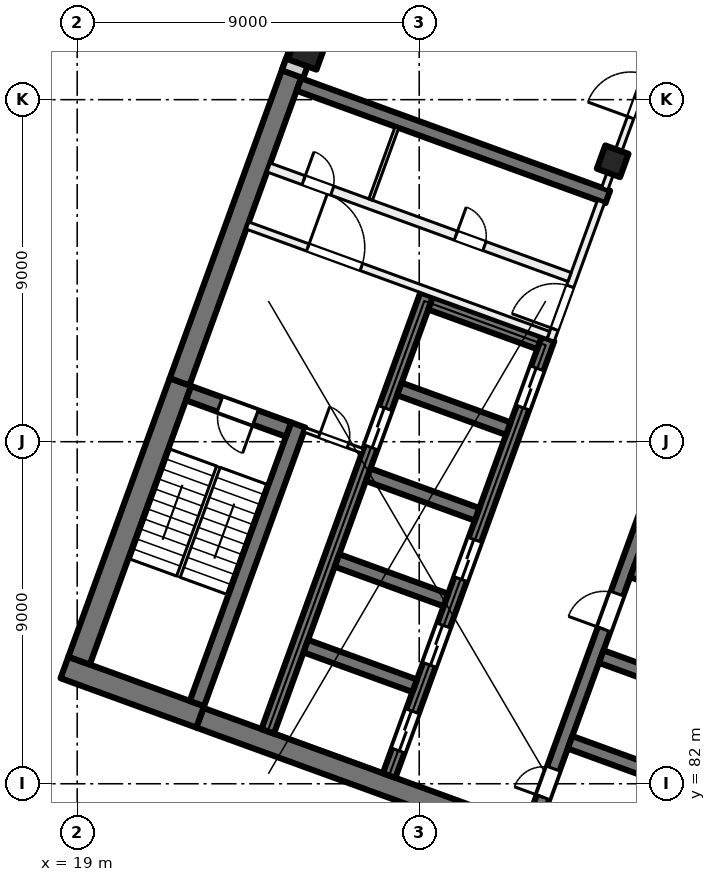
"""IFC4 building model, lengths in metres.
Left out: names, types, materials, properties, quantities, classifications, styles, units other than length and angle.
Written with IfcOpenShell. Run it as: python <this file> out.ifc"""

import sys

from ifc_helpers import new_model, si_unit, direction, frame, frame_2d, origin, origin_2d, place, context, subcontext, project, spatial, rectangle, extrude, element, fill, save


model = new_model("IFC4")
c1 = context("Model", 3, precision=1e-05, world=origin(), true_north=direction((0.0, 1.0)))
c2 = subcontext(c1, "Body", "Model", "MODEL_VIEW")
j1 = project(units=[si_unit("LENGTHUNIT", "METRE"), si_unit("PLANEANGLEUNIT", "RADIAN")], contexts=[c1])
p1 = place(None, origin())
s1 = spatial("IfcSite", under=j1, at=p1, CompositionType="ELEMENT")
p2 = place(p1, origin())
s2 = spatial("IfcBuilding", under=s1, at=p2, CompositionType="ELEMENT")
p3 = place(p2, frame((0.0, 0.0, 174.5)))
s3 = spatial("IfcBuildingStorey", under=s2, at=p3, CompositionType="ELEMENT", Elevation=174.5)
p4 = place(p3, frame((33.091, 98.379, 0.0), z_axis=(0.0, 0.0, 1.0), x_axis=(-0.342020143326, -0.939692620786, 0.0)))
e1 = element("IfcColumn", 1, at=p4, inside=s3, PredefinedType="COLUMN", context=c2, shape_type="SweptSolid", body=[
    extrude(rectangle(XDim=0.65, YDim=0.65, at=origin_2d()), origin(), (0.0, 0.0, 1.0), 4.0),
])
p5 = place(p3, frame((25.056, 101.303, 0.0), z_axis=(0.0, 0.0, 1.0), x_axis=(-0.342020143326, -0.939692620786, 0.0)))
e2 = element("IfcColumn", 2, at=p5, inside=s3, PredefinedType="COLUMN", context=c2, shape_type="SweptSolid", body=[
    extrude(rectangle(XDim=0.8, YDim=0.8, at=origin_2d()), origin(), (0.0, 0.0, 1.0), 4.0),
])
p6 = place(p3, frame((35.759, 78.811, 0.0), z_axis=(0.0, 0.0, 1.0), x_axis=(-0.939692894512, 0.342019391267, 0.0)))
e3 = element("IfcWall", 3, at=p6, inside=s3, PredefinedType="SHEAR", context=c2, shape_type="SweptSolid", body=[
    extrude(rectangle(XDim=14.4, YDim=0.55, at=frame_2d((7.2, 0.0))), origin(), (0.0, 0.0, 1.0), 4.0),
])
p7 = place(p3, frame((22.236, 83.76, 0.0), z_axis=(0.0, 0.0, 1.0), x_axis=(-0.939680822529, 0.342052557032, 0.0)))
e4 = element("IfcWall", 4, at=p7, inside=s3, PredefinedType="SHEAR", context=c2, shape_type="SweptSolid", body=[
    extrude(rectangle(XDim=3.8, YDim=0.6, at=frame_2d((1.9, 0.0))), origin(), (0.0, 0.0, 1.0), 4.0),
])
p8 = place(p3, frame((19.05, 85.239, 0.0), z_axis=(0.0, 0.0, 1.0), x_axis=(0.342016982193, 0.939693771338, 0.0)))
e5 = element("IfcWall", 5, at=p8, inside=s3, PredefinedType="SHEAR", context=c2, shape_type="SweptSolid", body=[
    extrude(rectangle(XDim=7.8, YDim=0.6, at=frame_2d((3.9, 0.0))), origin(), (0.0, 0.0, 1.0), 4.0),
])
p9 = place(p3, frame((21.694, 92.577, 0.0), z_axis=(0.0, 0.0, 1.0), x_axis=(0.342010253184, 0.939696220444, 0.0)))
e6 = element("IfcWall", 6, at=p9, inside=s3, PredefinedType="SHEAR", context=c2, shape_type="SweptSolid", body=[
    extrude(rectangle(XDim=8.95, YDim=0.55, at=frame_2d((4.475, 0.0))), origin(), (0.0, 0.0, 1.0), 4.0),
])
p10 = place(p3, frame((22.15, 84.11, 0.0), z_axis=(0.0, 0.0, 1.0), x_axis=(0.342016982193, 0.939693771338, 0.0)))
e7 = element("IfcWall", 7, at=p10, inside=s3, PredefinedType="SHEAR", context=c2, shape_type="SweptSolid", body=[
    extrude(rectangle(XDim=7.8, YDim=0.4, at=frame_2d((3.9, 0.0))), origin(), (0.0, 0.0, 1.0), 4.0),
])
p11 = place(p3, frame((24.562, 91.32, 0.0), z_axis=(0.0, 0.0, 1.0), x_axis=(-0.939717030584, 0.341953070509, 0.0)))
e8 = element("IfcWall", 8, at=p11, inside=s3, PredefinedType="SHEAR", context=c2, shape_type="SweptSolid", body=[
    extrude(rectangle(XDim=2.8, YDim=0.4, at=frame_2d((1.4, 0.0))), origin(), (0.0, 0.0, 1.0), 4.0),
])
p12 = place(p11, frame((0.925, 0.0, 0.0)))
e9 = element("IfcOpeningElement", 9, at=p12, cuts=e8, PredefinedType="OPENING", context=c2, shape_type="SweptSolid", body=[
    extrude(rectangle(XDim=1.0, YDim=2.1, at=frame_2d((0.5, 1.05))), frame((0.0, 0.21, 0.0), z_axis=(0.0, -1.0, 0.0), x_axis=(1.0, 0.0, 0.0)), (0.0, 0.0, 1.0), 0.42),
])
p13 = place(p3, frame((30.967, 80.848, 0.0), z_axis=(0.0, 0.0, 1.0), x_axis=(0.34201563943, 0.939694260058, 0.0)))
e10 = element("IfcWall", 10, at=p13, inside=s3, PredefinedType="SHEAR", context=c2, shape_type="SweptSolid", body=[
    extrude(rectangle(XDim=12.225, YDim=0.35, at=frame_2d((6.113, 0.0))), origin(), (0.0, 0.0, 1.0), 4.0),
])
p14 = place(p13, frame((0.85, 0.0, 0.0)))
e11 = element("IfcOpeningElement", 11, at=p14, cuts=e10, PredefinedType="OPENING", context=c2, shape_type="SweptSolid", body=[
    extrude(rectangle(XDim=0.8, YDim=2.1, at=frame_2d((0.4, 1.05))), frame((0.0, 0.185, 0.0), z_axis=(0.0, -1.0, 0.0), x_axis=(1.0, 0.0, 0.0)), (0.0, 0.0, 1.0), 0.37),
])
p15 = place(p13, frame((5.55, 0.0, 0.0)))
e12 = element("IfcOpeningElement", 12, at=p15, cuts=e10, PredefinedType="OPENING", context=c2, shape_type="SweptSolid", body=[
    extrude(rectangle(XDim=1.0, YDim=2.1, at=frame_2d((0.5, 1.05))), frame((0.0, 0.185, 0.0), z_axis=(0.0, -1.0, 0.0), x_axis=(1.0, 0.0, 0.0)), (0.0, 0.0, 1.0), 0.37),
])
p16 = place(p3, frame((34.835, 82.047, 0.0), z_axis=(0.0, 0.0, 1.0), x_axis=(-0.939683528043, 0.3420451244, 0.0)))
e13 = element("IfcWall", 13, at=p16, inside=s3, PredefinedType="SHEAR", context=c2, shape_type="SweptSolid", body=[
    extrude(rectangle(XDim=3.05, YDim=0.35, at=frame_2d((1.525, 0.0))), origin(), (0.0, 0.0, 1.0), 4.0),
])
p17 = place(p3, frame((35.656, 84.303, 0.0), z_axis=(0.0, 0.0, 1.0), x_axis=(-0.939709254651, 0.341974438698, 0.0)))
e14 = element("IfcWall", 14, at=p17, inside=s3, PredefinedType="SHEAR", context=c2, shape_type="SweptSolid", body=[
    extrude(rectangle(XDim=3.05, YDim=0.35, at=frame_2d((1.525, 0.0))), origin(), (0.0, 0.0, 1.0), 4.0),
])
p18 = place(p3, frame((36.477, 86.558, 0.0), z_axis=(0.0, 0.0, 1.0), x_axis=(-0.939683528043, 0.3420451244, 0.0)))
e15 = element("IfcWall", 15, at=p18, inside=s3, PredefinedType="SHEAR", context=c2, shape_type="SweptSolid", body=[
    extrude(rectangle(XDim=3.05, YDim=0.35, at=frame_2d((1.525, 0.0))), origin(), (0.0, 0.0, 1.0), 4.0),
])
p19 = place(p3, frame((27.208, 82.216, 0.0), z_axis=(0.0, 0.0, 1.0), x_axis=(0.34201563943, 0.939694260058, 0.0)))
e16 = element("IfcWall", 16, at=p19, inside=s3, PredefinedType="SHEAR", context=c2, shape_type="SweptSolid", body=[
    extrude(rectangle(XDim=12.225, YDim=0.35, at=frame_2d((6.113, 0.0))), origin(), (0.0, 0.0, 1.0), 4.0),
])
p20 = place(p19, frame((0.7, 0.0, 0.0)))
e17 = element("IfcOpeningElement", 17, at=p20, cuts=e16, PredefinedType="OPENING", context=c2, shape_type="SweptSolid", body=[
    extrude(rectangle(XDim=1.1, YDim=2.1, at=frame_2d((0.55, 1.05))), frame((0.0, 0.185, 0.0), z_axis=(0.0, -1.0, 0.0), x_axis=(1.0, 0.0, 0.0)), (0.0, 0.0, 1.0), 0.37),
])
p21 = place(p19, frame((3.1, 0.0, 0.0)))
e18 = element("IfcOpeningElement", 18, at=p21, cuts=e16, PredefinedType="OPENING", context=c2, shape_type="SweptSolid", body=[
    extrude(rectangle(XDim=1.1, YDim=2.1, at=frame_2d((0.55, 1.05))), frame((0.0, 0.185, 0.0), z_axis=(0.0, -1.0, 0.0), x_axis=(1.0, 0.0, 0.0)), (0.0, 0.0, 1.0), 0.37),
])
p22 = place(p19, frame((5.5, 0.0, 0.0)))
e19 = element("IfcOpeningElement", 19, at=p22, cuts=e16, PredefinedType="OPENING", context=c2, shape_type="SweptSolid", body=[
    extrude(rectangle(XDim=1.1, YDim=2.1, at=frame_2d((0.55, 1.05))), frame((0.0, 0.185, 0.0), z_axis=(0.0, -1.0, 0.0), x_axis=(1.0, 0.0, 0.0)), (0.0, 0.0, 1.0), 0.37),
])
p23 = place(p19, frame((10.3, 0.0, 0.0)))
e20 = element("IfcOpeningElement", 20, at=p23, cuts=e16, PredefinedType="OPENING", context=c2, shape_type="SweptSolid", body=[
    extrude(rectangle(XDim=1.1, YDim=2.1, at=frame_2d((0.55, 1.05))), frame((0.0, 0.185, 0.0), z_axis=(0.0, -1.0, 0.0), x_axis=(1.0, 0.0, 0.0)), (0.0, 0.0, 1.0), 0.37),
])
p24 = place(p3, frame((24.013, 83.379, 0.0), z_axis=(0.0, 0.0, 1.0), x_axis=(0.34201563943, 0.939694260058, 0.0)))
e21 = element("IfcWall", 21, at=p24, inside=s3, PredefinedType="SHEAR", context=c2, shape_type="SweptSolid", body=[
    extrude(rectangle(XDim=12.225, YDim=0.35, at=frame_2d((6.113, 0.0))), origin(), (0.0, 0.0, 1.0), 4.0),
])
p25 = place(p24, frame((7.95, 0.0, 0.0)))
e22 = element("IfcOpeningElement", 22, at=p25, cuts=e21, PredefinedType="OPENING", context=c2, shape_type="SweptSolid", body=[
    extrude(rectangle(XDim=1.1, YDim=2.1, at=frame_2d((0.55, 1.05))), frame((0.0, 0.185, 0.0), z_axis=(0.0, -1.0, 0.0), x_axis=(1.0, 0.0, 0.0)), (0.0, 0.0, 1.0), 0.37),
])
for number, where, z_axis, x_axis in (
    (23, (27.881, 84.578, 0.0), (0.0, 0.0, 1.0), (-0.94, 0.342, 0.0)),
    (24, (28.702, 86.833, 0.0), (0.0, 0.0, 1.0), (-0.94, 0.342, 0.0)),
    (25, (29.523, 89.089, 0.0), (0.0, 0.0, 1.0), (-0.94, 0.342, 0.0)),
):
    element("IfcWall", number, at=place(p3, frame(where, z_axis=z_axis, x_axis=x_axis)), inside=s3, PredefinedType="SHEAR", context=c2, shape_type="SweptSolid", body=[
        extrude(rectangle(XDim=3.05, YDim=0.35, at=frame_2d((1.525, 0.0))), origin(), (0.0, 0.0, 1.0), 4.0),
    ])
p26 = place(p3, frame((30.344, 91.344, 0.0), z_axis=(0.0, 0.0, 1.0), x_axis=(-0.939709254651, 0.341974438698, 0.0)))
e26 = element("IfcWall", 26, at=p26, inside=s3, PredefinedType="SHEAR", context=c2, shape_type="SweptSolid", body=[
    extrude(rectangle(XDim=3.05, YDim=0.35, at=frame_2d((1.525, 0.0))), origin(), (0.0, 0.0, 1.0), 4.0),
])
p27 = place(p3, frame((31.165, 93.599, 0.0), z_axis=(0.0, 0.0, 1.0), x_axis=(-0.939683528043, 0.3420451244, 0.0)))
e27 = element("IfcWall", 27, at=p27, inside=s3, PredefinedType="SHEAR", context=c2, shape_type="SweptSolid", body=[
    extrude(rectangle(XDim=3.05, YDim=0.35, at=frame_2d((1.525, 0.0))), origin(), (0.0, 0.0, 1.0), 4.0),
])
p28 = place(p3, frame((32.962, 97.441, 0.0), z_axis=(0.0, 0.0, 1.0), x_axis=(-0.939689545667, 0.342028592028, 0.0)))
e28 = element("IfcWall", 28, at=p28, inside=s3, PredefinedType="SHEAR", context=c2, shape_type="SweptSolid", body=[
    extrude(rectangle(XDim=8.65, YDim=0.35, at=frame_2d((4.325, 0.0))), origin(), (0.0, 0.0, 1.0), 4.0),
])
p29 = place(p3, frame((24.666, 100.669, 0.0), z_axis=(0.0, 0.0, 1.0), x_axis=(0.34201964167, 0.939692803373, 0.0)))
e29 = element("IfcWall", 29, at=p29, inside=s3, PredefinedType="SOLIDWALL", context=c2, shape_type="SweptSolid", body=[
    extrude(rectangle(XDim=32.884, YDim=0.6, at=frame_2d((16.442, 0.0))), origin(), (0.0, 0.0, 1.0), 3.625),
])
p30 = place(p29, frame((1.48, 0.0, 0.9)))
e30 = element("IfcOpeningElement", 30, at=p30, cuts=e29, PredefinedType="OPENING", context=c2, shape_type="SweptSolid", body=[
    extrude(rectangle(XDim=3.0, YDim=2.4, at=frame_2d((1.5, 1.2))), frame((0.0, 0.31, 0.0), z_axis=(0.0, -1.0, 0.0), x_axis=(1.0, 0.0, 0.0)), (0.0, 0.0, 1.0), 0.62),
])
p31 = place(p29, frame((5.98, 0.0, 0.9)))
e31 = element("IfcOpeningElement", 31, at=p31, cuts=e29, PredefinedType="OPENING", context=c2, shape_type="SweptSolid", body=[
    extrude(rectangle(XDim=3.0, YDim=2.4, at=frame_2d((1.5, 1.2))), frame((0.0, 0.31, 0.0), z_axis=(0.0, -1.0, 0.0), x_axis=(1.0, 0.0, 0.0)), (0.0, 0.0, 1.0), 0.62),
])
p32 = place(p29, frame((10.48, 0.0, 0.9)))
e32 = element("IfcOpeningElement", 32, at=p32, cuts=e29, PredefinedType="OPENING", context=c2, shape_type="SweptSolid", body=[
    extrude(rectangle(XDim=3.0, YDim=2.4, at=frame_2d((1.5, 1.2))), frame((0.0, 0.31, 0.0), z_axis=(0.0, -1.0, 0.0), x_axis=(1.0, 0.0, 0.0)), (0.0, 0.0, 1.0), 0.62),
])
p33 = place(p29, frame((14.98, 0.0, 0.9)))
e33 = element("IfcOpeningElement", 33, at=p33, cuts=e29, PredefinedType="OPENING", context=c2, shape_type="SweptSolid", body=[
    extrude(rectangle(XDim=3.0, YDim=2.4, at=frame_2d((1.5, 1.2))), frame((0.0, 0.31, 0.0), z_axis=(0.0, -1.0, 0.0), x_axis=(1.0, 0.0, 0.0)), (0.0, 0.0, 1.0), 0.62),
])
p34 = place(p29, frame((19.48, 0.0, 0.9)))
e34 = element("IfcOpeningElement", 34, at=p34, cuts=e29, PredefinedType="OPENING", context=c2, shape_type="SweptSolid", body=[
    extrude(rectangle(XDim=3.0, YDim=2.4, at=frame_2d((1.5, 1.2))), frame((0.0, 0.31, 0.0), z_axis=(0.0, -1.0, 0.0), x_axis=(1.0, 0.0, 0.0)), (0.0, 0.0, 1.0), 0.62),
])
p35 = place(p29, frame((23.98, 0.0, 0.9)))
e35 = element("IfcOpeningElement", 35, at=p35, cuts=e29, PredefinedType="OPENING", context=c2, shape_type="SweptSolid", body=[
    extrude(rectangle(XDim=3.0, YDim=2.4, at=frame_2d((1.5, 1.2))), frame((0.0, 0.31, 0.0), z_axis=(0.0, -1.0, 0.0), x_axis=(1.0, 0.0, 0.0)), (0.0, 0.0, 1.0), 0.62),
])
p36 = place(p29, frame((28.48, 0.0, 0.9)))
e36 = element("IfcOpeningElement", 36, at=p36, cuts=e29, PredefinedType="OPENING", context=c2, shape_type="SweptSolid", body=[
    extrude(rectangle(XDim=3.0, YDim=2.4, at=frame_2d((1.5, 1.2))), frame((0.0, 0.31, 0.0), z_axis=(0.0, -1.0, 0.0), x_axis=(1.0, 0.0, 0.0)), (0.0, 0.0, 1.0), 0.62),
])
p37 = place(p3, frame((31.459, 93.678, 0.0), z_axis=(0.0, 0.0, 1.0), x_axis=(0.341985870128, 0.939705094502, 0.0)))
e37 = element("IfcWall", 37, at=p37, inside=s3, PredefinedType="PARTITIONING", context=c2, shape_type="SweptSolid", body=[
    extrude(rectangle(XDim=3.875, YDim=0.2, at=frame_2d((1.938, 0.0))), origin(), (0.0, 0.0, 1.0), 3.625),
])
p38 = place(p37, frame((0.3, 0.0, 0.0)))
e38 = element("IfcOpeningElement", 38, at=p38, cuts=e37, PredefinedType="OPENING", context=c2, shape_type="SweptSolid", body=[
    extrude(rectangle(XDim=1.2, YDim=2.1, at=frame_2d((0.6, 1.05))), frame((0.0, 0.11, 0.0), z_axis=(0.0, -1.0, 0.0), x_axis=(1.0, 0.0, 0.0)), (0.0, 0.0, 1.0), 0.22),
])
p39 = place(p3, frame((23.483, 96.688, 0.0), z_axis=(0.0, 0.0, 1.0), x_axis=(0.939691007314, -0.342024576271, 0.0)))
e39 = element("IfcWall", 39, at=p39, inside=s3, PredefinedType="PARTITIONING", context=c2, shape_type="SweptSolid", body=[
    extrude(rectangle(XDim=8.425, YDim=0.2, at=frame_2d((4.212, 0.0))), origin(), (0.0, 0.0, 1.0), 3.625),
])
p40 = place(p39, frame((1.688, 0.0, 0.0)))
e40 = element("IfcOpeningElement", 40, at=p40, cuts=e39, PredefinedType="OPENING", context=c2, shape_type="SweptSolid", body=[
    extrude(rectangle(XDim=1.5, YDim=2.1, at=frame_2d((0.75, 1.05))), frame((0.0, 0.11, 0.0), z_axis=(0.0, -1.0, 0.0), x_axis=(1.0, 0.0, 0.0)), (0.0, 0.0, 1.0), 0.22),
])
p41 = place(p3, frame((24.039, 98.215, 0.0), z_axis=(0.0, 0.0, 1.0), x_axis=(0.939687617333, -0.342033889887, 0.0)))
e41 = element("IfcWall", 41, at=p41, inside=s3, PredefinedType="PARTITIONING", context=c2, shape_type="SweptSolid", body=[
    extrude(rectangle(XDim=8.425, YDim=0.25, at=frame_2d((4.212, 0.0))), origin(), (0.0, 0.0, 1.0), 3.625),
])
p42 = place(p41, frame((5.242, 0.0, 0.0)))
e42 = element("IfcOpeningElement", 42, at=p42, cuts=e41, PredefinedType="OPENING", context=c2, shape_type="SweptSolid", body=[
    extrude(rectangle(XDim=0.8, YDim=2.1, at=frame_2d((0.4, 1.05))), frame((0.0, 0.135, 0.0), z_axis=(0.0, -1.0, 0.0), x_axis=(1.0, 0.0, 0.0)), (0.0, 0.0, 1.0), 0.27),
])
p43 = place(p41, frame((0.98, 0.0, 0.0)))
e43 = element("IfcOpeningElement", 43, at=p43, cuts=e41, PredefinedType="OPENING", context=c2, shape_type="SweptSolid", body=[
    extrude(rectangle(XDim=0.8, YDim=2.1, at=frame_2d((0.4, 1.05))), frame((0.0, 0.135, 0.0), z_axis=(0.0, -1.0, 0.0), x_axis=(1.0, 0.0, 0.0)), (0.0, 0.0, 1.0), 0.27),
])
p44 = place(p3, frame((24.985, 91.312, 0.0), z_axis=(0.0, 0.0, 1.0), x_axis=(0.939705651352, -0.341984340019, 0.0)))
e44 = element("IfcWall", 44, at=p44, inside=s3, PredefinedType="PARTITIONING", context=c2, shape_type="SweptSolid", body=[
    extrude(rectangle(XDim=1.625, YDim=0.125, at=frame_2d((0.812, 0.0))), origin(), (0.0, 0.0, 1.0), 3.625),
])
p45 = place(p44, frame((0.413, 0.0, 0.0)))
e45 = element("IfcOpeningElement", 45, at=p45, cuts=e44, PredefinedType="OPENING", context=c2, shape_type="SweptSolid", body=[
    extrude(rectangle(XDim=0.8, YDim=2.1, at=frame_2d((0.4, 1.05))), frame((0.0, 0.073, 0.0), z_axis=(0.0, -1.0, 0.0), x_axis=(1.0, 0.0, 0.0)), (0.0, 0.0, 1.0), 0.145),
])
p46 = place(p3, frame((26.722, 97.371, 0.0), z_axis=(0.0, 0.0, 1.0), x_axis=(0.342004391282, 0.939698353911, 0.0)))
e46 = element("IfcWall", 46, at=p46, inside=s3, PredefinedType="PARTITIONING", context=c2, shape_type="SweptSolid", body=[
    extrude(rectangle(XDim=2.025, YDim=0.1, at=frame_2d((1.013, 0.0))), origin(), (0.0, 0.0, 1.0), 3.625),
])
p47 = place(p3, frame((32.881, 97.657, 0.0), z_axis=(0.0, 0.0, 1.0), x_axis=(0.342058204353, 0.939678766832, 0.0)))
e47 = element("IfcWall", 47, at=p47, inside=s3, PredefinedType="PARTITIONING", context=c2, shape_type="SweptSolid", body=[
    extrude(rectangle(XDim=5.163, YDim=0.175, at=frame_2d((2.581, 0.0))), origin(), (0.0, 0.0, 1.0), 3.625),
])
p48 = place(p47, frame((1.991, 0.0, 0.0)))
e48 = element("IfcOpeningElement", 48, at=p48, cuts=e47, PredefinedType="OPENING", context=c2, shape_type="SweptSolid", body=[
    extrude(rectangle(XDim=1.2, YDim=2.1, at=frame_2d((0.6, 1.05))), frame((0.0, 0.097, 0.0), z_axis=(0.0, -1.0, 0.0), x_axis=(1.0, 0.0, 0.0)), (0.0, 0.0, 1.0), 0.195),
])
p49 = place(p20, origin())
e49 = element("IfcDoor", 49, at=p49, inside=s3, OperationType="DOUBLE_DOOR_SLIDING", PredefinedType="DOOR", context=c2, shape_type="SweptSolid", body=[
    extrude(rectangle(XDim=1.1, YDim=2.1, at=frame_2d((0.55, 1.05))), frame((0.0, 0.025, 0.0), z_axis=(0.0, -1.0, 0.0), x_axis=(1.0, 0.0, 0.0)), (0.0, 0.0, 1.0), 0.05),
])
fill(e17, e49)
p50 = place(p21, origin())
e50 = element("IfcDoor", 50, at=p50, inside=s3, OperationType="DOUBLE_DOOR_SLIDING", PredefinedType="DOOR", context=c2, shape_type="SweptSolid", body=[
    extrude(rectangle(XDim=1.1, YDim=2.1, at=frame_2d((0.55, 1.05))), frame((0.0, 0.025, 0.0), z_axis=(0.0, -1.0, 0.0), x_axis=(1.0, 0.0, 0.0)), (0.0, 0.0, 1.0), 0.05),
])
fill(e18, e50)
p51 = place(p22, origin())
e51 = element("IfcDoor", 51, at=p51, inside=s3, OperationType="DOUBLE_DOOR_SLIDING", PredefinedType="DOOR", context=c2, shape_type="SweptSolid", body=[
    extrude(rectangle(XDim=1.1, YDim=2.1, at=frame_2d((0.55, 1.05))), frame((0.0, 0.025, 0.0), z_axis=(0.0, -1.0, 0.0), x_axis=(1.0, 0.0, 0.0)), (0.0, 0.0, 1.0), 0.05),
])
fill(e19, e51)
p52 = place(p23, origin())
e52 = element("IfcDoor", 52, at=p52, inside=s3, OperationType="DOUBLE_DOOR_SLIDING", PredefinedType="DOOR", context=c2, shape_type="SweptSolid", body=[
    extrude(rectangle(XDim=1.1, YDim=2.1, at=frame_2d((0.55, 1.05))), frame((0.0, 0.025, 0.0), z_axis=(0.0, -1.0, 0.0), x_axis=(1.0, 0.0, 0.0)), (0.0, 0.0, 1.0), 0.05),
])
fill(e20, e52)
p53 = place(p14, origin())
e53 = element("IfcDoor", 53, at=p53, inside=s3, OperationType="SINGLE_SWING_LEFT", PredefinedType="DOOR", context=c2, shape_type="SweptSolid", body=[
    extrude(rectangle(XDim=0.8, YDim=2.1, at=frame_2d((0.4, 1.05))), frame((0.0, 0.025, 0.0), z_axis=(0.0, -1.0, 0.0), x_axis=(1.0, 0.0, 0.0)), (0.0, 0.0, 1.0), 0.05),
])
fill(e11, e53)
p54 = place(p15, origin())
e54 = element("IfcDoor", 54, at=p54, inside=s3, OperationType="SINGLE_SWING_RIGHT", PredefinedType="DOOR", context=c2, shape_type="SweptSolid", body=[
    extrude(rectangle(XDim=1.0, YDim=2.1, at=frame_2d((0.5, 1.05))), frame((0.0, 0.025, 0.0), z_axis=(0.0, -1.0, 0.0), x_axis=(1.0, 0.0, 0.0)), (0.0, 0.0, 1.0), 0.05),
])
fill(e12, e54)
p55 = place(p38, origin())
e55 = element("IfcDoor", 55, at=p55, inside=s3, OperationType="DOUBLE_DOOR_SINGLE_SWING", PredefinedType="DOOR", context=c2, shape_type="SweptSolid", body=[
    extrude(rectangle(XDim=1.2, YDim=2.1, at=frame_2d((0.6, 1.05))), frame((0.0, 0.025, 0.0), z_axis=(0.0, -1.0, 0.0), x_axis=(1.0, 0.0, 0.0)), (0.0, 0.0, 1.0), 0.05),
])
fill(e38, e55)
p56 = place(p40, origin())
e56 = element("IfcDoor", 56, at=p56, inside=s3, OperationType="DOUBLE_DOOR_SINGLE_SWING", PredefinedType="DOOR", context=c2, shape_type="SweptSolid", body=[
    extrude(rectangle(XDim=1.5, YDim=2.1, at=frame_2d((0.75, 1.05))), frame((0.0, 0.025, 0.0), z_axis=(0.0, -1.0, 0.0), x_axis=(1.0, 0.0, 0.0)), (0.0, 0.0, 1.0), 0.05),
])
fill(e40, e56)
p57 = place(p12, origin())
e57 = element("IfcDoor", 57, at=p57, inside=s3, OperationType="SINGLE_SWING_LEFT", PredefinedType="DOOR", context=c2, shape_type="SweptSolid", body=[
    extrude(rectangle(XDim=1.0, YDim=2.1, at=frame_2d((0.5, 1.05))), frame((0.0, 0.025, 0.0), z_axis=(0.0, -1.0, 0.0), x_axis=(1.0, 0.0, 0.0)), (0.0, 0.0, 1.0), 0.05),
])
fill(e9, e57)
p58 = place(p45, origin())
e58 = element("IfcDoor", 58, at=p58, inside=s3, OperationType="SINGLE_SWING_RIGHT", PredefinedType="DOOR", context=c2, shape_type="SweptSolid", body=[
    extrude(rectangle(XDim=0.8, YDim=2.1, at=frame_2d((0.4, 1.05))), frame((0.0, 0.025, 0.0), z_axis=(0.0, -1.0, 0.0), x_axis=(1.0, 0.0, 0.0)), (0.0, 0.0, 1.0), 0.05),
])
fill(e45, e58)
p59 = place(p42, origin())
e59 = element("IfcDoor", 59, at=p59, inside=s3, OperationType="SINGLE_SWING_LEFT", PredefinedType="DOOR", context=c2, shape_type="SweptSolid", body=[
    extrude(rectangle(XDim=0.8, YDim=2.1, at=frame_2d((0.4, 1.05))), frame((0.0, 0.025, 0.0), z_axis=(0.0, -1.0, 0.0), x_axis=(1.0, 0.0, 0.0)), (0.0, 0.0, 1.0), 0.05),
])
fill(e42, e59)
p60 = place(p43, origin())
e60 = element("IfcDoor", 60, at=p60, inside=s3, OperationType="SINGLE_SWING_RIGHT", PredefinedType="DOOR", context=c2, shape_type="SweptSolid", body=[
    extrude(rectangle(XDim=0.8, YDim=2.1, at=frame_2d((0.4, 1.05))), frame((0.0, 0.025, 0.0), z_axis=(0.0, -1.0, 0.0), x_axis=(1.0, 0.0, 0.0)), (0.0, 0.0, 1.0), 0.05),
])
fill(e43, e60)
p61 = place(p25, origin())
e61 = element("IfcDoor", 61, at=p61, inside=s3, OperationType="DOUBLE_DOOR_SLIDING", PredefinedType="DOOR", context=c2, shape_type="SweptSolid", body=[
    extrude(rectangle(XDim=1.1, YDim=2.1, at=frame_2d((0.55, 1.05))), frame((0.0, 0.025, 0.0), z_axis=(0.0, -1.0, 0.0), x_axis=(1.0, 0.0, 0.0)), (0.0, 0.0, 1.0), 0.05),
])
fill(e22, e61)
p62 = place(p48, origin())
e62 = element("IfcDoor", 62, at=p62, inside=s3, OperationType="DOUBLE_DOOR_SINGLE_SWING", PredefinedType="DOOR", context=c2, shape_type="SweptSolid", body=[
    extrude(rectangle(XDim=1.2, YDim=2.1, at=frame_2d((0.6, 1.05))), frame((0.0, 0.025, 0.0), z_axis=(0.0, -1.0, 0.0), x_axis=(1.0, 0.0, 0.0)), (0.0, 0.0, 1.0), 0.05),
])
fill(e48, e62)
save(model, sys.argv[1])
